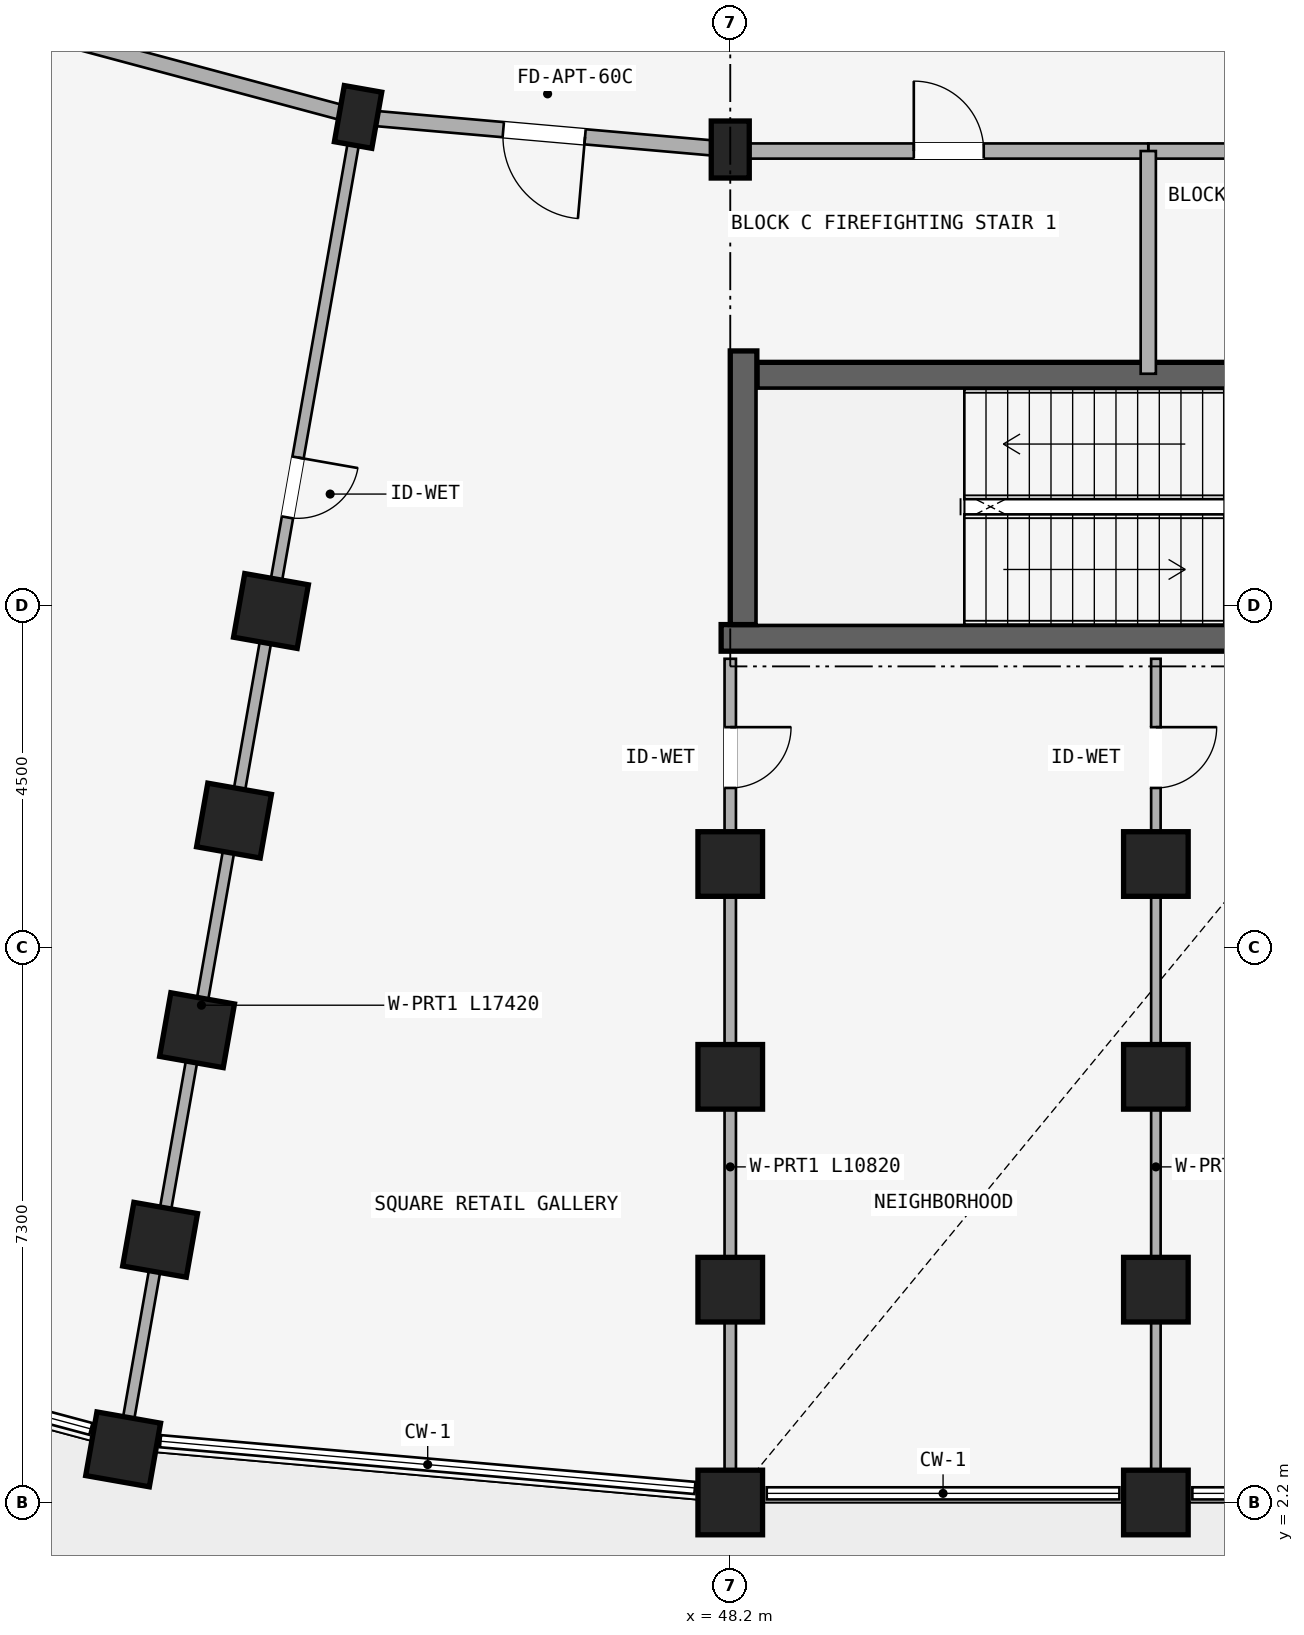
"""IFC4 building model, lengths in metres.
Left out: names, types, materials, properties, quantities, classifications, styles, units other than length and angle.
Written with IfcOpenShell. Run it as: python <this file> out.ifc"""

import sys

from ifc_helpers import new_model, si_unit, direction, frame, frame_2d, origin, origin_2d, place, context, subcontext, project, spatial, rectangle, extrude, element, fill, save


model = new_model("IFC4")
c1 = context("Model", 3, precision=1e-05, world=origin(), true_north=direction((0.0, 1.0)))
c2 = subcontext(c1, "Body", "Model", "MODEL_VIEW")
j1 = project(units=[si_unit("LENGTHUNIT", "METRE"), si_unit("PLANEANGLEUNIT", "RADIAN")], contexts=[c1])
p1 = place(None, origin())
s1 = spatial("IfcSite", under=j1, at=p1, CompositionType="ELEMENT")
p2 = place(p1, origin())
s2 = spatial("IfcBuilding", under=s1, at=p2, CompositionType="ELEMENT")
p3 = place(p2, origin())
s3 = spatial("IfcBuildingStorey", under=s2, at=p3, CompositionType="ELEMENT", Elevation=0.0)
p4 = place(p3, frame((48.08, 13.575, 0.0), z_axis=(0.0, 0.0, 1.0), x_axis=(1.0, 0.0, 0.0)))
e1 = element("IfcWall", 1, at=p4, inside=s3, PredefinedType="SHEAR", context=c2, shape_type="SweptSolid", body=[
    extrude(rectangle(XDim=8.545, YDim=0.35, at=frame_2d((4.272, 0.0))), origin(), (0.0, 0.0, 1.0), 4.15),
])
p5 = place(p3, frame((48.55, 17.025, 0.0), z_axis=(0.0, 0.0, 1.0), x_axis=(1.0, 0.0, 0.0)))
e2 = element("IfcWall", 2, at=p5, inside=s3, PredefinedType="SHEAR", context=c2, shape_type="SweptSolid", body=[
    extrude(rectangle(XDim=8.075, YDim=0.35, at=frame_2d((4.038, 0.0))), origin(), (0.0, 0.0, 1.0), 4.15),
])
p6 = place(p5, frame((6.38, 0.0, 0.0)))
e3 = element("IfcOpeningElement", 3, at=p6, cuts=e2, PredefinedType="OPENING", context=c2, shape_type="SweptSolid", body=[
    extrude(rectangle(XDim=1.24, YDim=2.15, at=frame_2d((0.62, 1.075))), frame((0.0, 0.185, 0.0), z_axis=(0.0, -1.0, 0.0), x_axis=(1.0, 0.0, 0.0)), (0.0, 0.0, 1.0), 0.37),
])
p7 = place(p3, frame((48.375, 17.35, 0.0), z_axis=(0.0, 0.0, 1.0), x_axis=(0.0, -1.0, 0.0)))
e4 = element("IfcWall", 4, at=p7, inside=s3, PredefinedType="SHEAR", context=c2, shape_type="SweptSolid", body=[
    extrude(rectangle(XDim=3.6, YDim=0.35, at=frame_2d((1.8, 0.0))), origin(), (0.0, 0.0, 1.0), 4.15),
])
p8 = place(p3, frame((48.2, 20.0, 0.0), z_axis=(0.0, 0.0, 1.0), x_axis=(1.0, 0.0, 0.0)))
e5 = element("IfcColumn", 5, at=p8, inside=s3, PredefinedType="COLUMN", context=c2, shape_type="SweptSolid", body=[
    extrude(rectangle(XDim=0.5, YDim=0.75, at=origin_2d()), origin(), (0.0, 0.0, 1.0), 4.15),
])
for number, where, z_axis, x_axis in (
    (6, (48.2, 10.6, 0.0), (0.0, 0.0, 1.0), (1.0, 0.0, 0.0)),
    (7, (48.2, 7.8, 0.0), (0.0, 0.0, 1.0), (1.0, 0.0, 0.0)),
    (8, (48.2, 5.0, 0.0), (0.0, 0.0, 1.0), (1.0, 0.0, 0.0)),
    (9, (48.2, 2.2, 0.0), (0.0, 0.0, 1.0), (1.0, 0.0, 0.0)),
):
    element("IfcColumn", number, at=place(p3, frame(where, z_axis=z_axis, x_axis=x_axis)), inside=s3, PredefinedType="COLUMN", context=c2, shape_type="SweptSolid", body=[
        extrude(rectangle(XDim=0.85, YDim=0.85, at=origin_2d()), origin(), (0.0, 0.0, 1.0), 4.15),
    ])
p9 = place(p3, frame((43.303, 20.428, 0.0), z_axis=(0.0, 0.0, 1.0), x_axis=(-0.984807753012, 0.173648177667, 0.0)))
e10 = element("IfcColumn", 10, at=p9, inside=s3, PredefinedType="COLUMN", context=c2, shape_type="SweptSolid", body=[
    extrude(rectangle(XDim=0.5, YDim=0.75, at=origin_2d()), origin(), (0.0, 0.0, 1.0), 4.15),
])
for number, where, z_axis, x_axis in (
    (11, (42.157, 13.929, 0.0), (0.0, 0.0, 1.0), (-0.985, 0.174, 0.0)),
    (12, (41.671, 11.171, 0.0), (0.0, 0.0, 1.0), (-0.985, 0.174, 0.0)),
    (13, (41.185, 8.414, 0.0), (0.0, 0.0, 1.0), (-0.985, 0.174, 0.0)),
    (14, (40.698, 5.656, 0.0), (0.0, 0.0, 1.0), (-0.985, 0.174, 0.0)),
    (15, (40.212, 2.899, 0.0), (0.0, 0.0, 1.0), (-0.985, 0.174, 0.0)),
    (16, (53.8, 10.6, 0.0), (0.0, 0.0, 1.0), (1.0, 0.0, 0.0)),
    (17, (53.8, 7.8, 0.0), (0.0, 0.0, 1.0), (1.0, 0.0, 0.0)),
    (18, (53.8, 5.0, 0.0), (0.0, 0.0, 1.0), (1.0, 0.0, 0.0)),
    (19, (53.8, 2.2, 0.0), (0.0, 0.0, 1.0), (1.0, 0.0, 0.0)),
):
    element("IfcColumn", number, at=place(p3, frame(where, z_axis=z_axis, x_axis=x_axis)), inside=s3, PredefinedType="COLUMN", context=c2, shape_type="SweptSolid", body=[
        extrude(rectangle(XDim=0.85, YDim=0.85, at=origin_2d()), origin(), (0.0, 0.0, 1.0), 4.15),
    ])
p10 = place(p3, frame((53.7, 19.98, 0.0), z_axis=(0.0, 0.0, 1.0), x_axis=(1.0, 0.0, 0.0)))
e20 = element("IfcWall", 20, at=p10, inside=s3, PredefinedType="STANDARD", context=c2, shape_type="SweptSolid", body=[
    extrude(rectangle(XDim=5.65, YDim=0.2, at=frame_2d((2.825, 0.0))), origin(), (0.0, 0.0, 1.0), 3.492),
])
p11 = place(p10, frame((1.923, 0.0, 0.0)))
e21 = element("IfcOpeningElement", 21, at=p11, cuts=e20, PredefinedType="OPENING", context=c2, shape_type="SweptSolid", body=[
    extrude(rectangle(XDim=1.24, YDim=2.15, at=frame_2d((0.62, 1.075))), frame((0.0, 0.11, 0.0), z_axis=(0.0, -1.0, 0.0), x_axis=(1.0, 0.0, 0.0)), (0.0, 0.0, 1.0), 0.22),
])
p12 = place(p3, frame((48.45, 19.98, 0.0), z_axis=(0.0, 0.0, 1.0), x_axis=(1.0, 0.0, 0.0)))
e22 = element("IfcWall", 22, at=p12, inside=s3, PredefinedType="STANDARD", context=c2, shape_type="SweptSolid", body=[
    extrude(rectangle(XDim=5.25, YDim=0.2, at=frame_2d((2.625, 0.0))), origin(), (0.0, 0.0, 1.0), 3.492),
])
p13 = place(p12, frame((2.165, 0.0, 0.0)))
e23 = element("IfcOpeningElement", 23, at=p13, cuts=e22, PredefinedType="OPENING", context=c2, shape_type="SweptSolid", body=[
    extrude(rectangle(XDim=0.92, YDim=2.1, at=frame_2d((0.46, 1.05))), frame((0.0, 0.11, 0.0), z_axis=(0.0, -1.0, 0.0), x_axis=(1.0, 0.0, 0.0)), (0.0, 0.0, 1.0), 0.22),
])
p14 = place(p3, frame((53.7, 19.98, 0.0), z_axis=(0.0, 0.0, 1.0), x_axis=(0.0, -1.0, 0.0)))
e24 = element("IfcWall", 24, at=p14, inside=s3, PredefinedType="STANDARD", context=c2, shape_type="SweptSolid", body=[
    extrude(rectangle(XDim=2.93, YDim=0.2, at=frame_2d((1.465, 0.0))), origin(), (0.0, 0.0, 1.0), 3.492),
])
p15 = place(p3, frame((53.8, 13.3, 0.0), z_axis=(0.0, 0.0, 1.0), x_axis=(0.0, -1.0, 0.0)))
e25 = element("IfcWall", 25, at=p15, inside=s3, PredefinedType="PARTITIONING", context=c2, shape_type="SweptSolid", body=[
    extrude(rectangle(XDim=10.82, YDim=0.125, at=frame_2d((5.41, 0.0))), origin(), (0.0, 0.0, 1.0), 3.492),
])
p16 = place(p15, frame((0.899, 0.0, 0.0)))
e26 = element("IfcOpeningElement", 26, at=p16, cuts=e25, PredefinedType="OPENING", context=c2, shape_type="SweptSolid", body=[
    extrude(rectangle(XDim=0.8, YDim=2.1, at=frame_2d((0.4, 1.05))), frame((0.0, 0.073, 0.0), z_axis=(0.0, -1.0, 0.0), x_axis=(1.0, 0.0, 0.0)), (0.0, 0.0, 1.0), 0.145),
])
p17 = place(p3, frame((48.2, 20.0, 0.0), z_axis=(0.0, 0.0, 1.0), x_axis=(-0.996193663584, 0.087167566415, 0.0)))
e27 = element("IfcWall", 27, at=p17, inside=s3, PredefinedType="STANDARD", context=c2, shape_type="SweptSolid", body=[
    extrude(rectangle(XDim=4.916, YDim=0.2, at=frame_2d((2.458, 0.0))), origin(), (0.0, 0.0, 1.0), 3.492),
])
p18 = place(p17, frame((1.918, 0.0, 0.0)))
e28 = element("IfcOpeningElement", 28, at=p18, cuts=e27, PredefinedType="OPENING", context=c2, shape_type="SweptSolid", body=[
    extrude(rectangle(XDim=1.08, YDim=2.15, at=frame_2d((0.54, 1.075))), frame((0.0, 0.11, 0.0), z_axis=(0.0, -1.0, 0.0), x_axis=(1.0, 0.0, 0.0)), (0.0, 0.0, 1.0), 0.22),
])
p19 = place(p3, frame((43.303, 20.428, 0.0), z_axis=(0.0, 0.0, 1.0), x_axis=(-0.965930095386, 0.258803112091, 0.0)))
e29 = element("IfcWall", 29, at=p19, inside=s3, PredefinedType="STANDARD", context=c2, shape_type="SweptSolid", body=[
    extrude(rectangle(XDim=4.916, YDim=0.2, at=frame_2d((2.458, 0.0))), origin(), (0.0, 0.0, 1.0), 2.942),
])
p20 = place(p3, frame((48.2, 13.3, 0.0), z_axis=(0.0, 0.0, 1.0), x_axis=(0.0, -1.0, 0.0)))
e30 = element("IfcWall", 30, at=p20, inside=s3, PredefinedType="PARTITIONING", context=c2, shape_type="SweptSolid", body=[
    extrude(rectangle(XDim=10.82, YDim=0.15, at=frame_2d((5.41, 0.0))), origin(), (0.0, 0.0, 1.0), 3.492),
])
p21 = place(p20, frame((0.899, 0.0, 0.0)))
e31 = element("IfcOpeningElement", 31, at=p21, cuts=e30, PredefinedType="OPENING", context=c2, shape_type="SweptSolid", body=[
    extrude(rectangle(XDim=0.8, YDim=2.1, at=frame_2d((0.4, 1.05))), frame((0.0, 0.085, 0.0), z_axis=(0.0, -1.0, 0.0), x_axis=(1.0, 0.0, 0.0)), (0.0, 0.0, 1.0), 0.17),
])
p22 = place(p3, frame((43.286, 20.33, 0.0), z_axis=(0.0, 0.0, 1.0), x_axis=(-0.173646216546, -0.984808098809, 0.0)))
e32 = element("IfcWall", 32, at=p22, inside=s3, PredefinedType="PARTITIONING", context=c2, shape_type="SweptSolid", body=[
    extrude(rectangle(XDim=17.42, YDim=0.15, at=frame_2d((8.71, 0.0))), origin(), (0.0, 0.0, 1.0), 2.942),
])
p23 = place(p22, frame((4.45, 0.0, 0.0)))
e33 = element("IfcOpeningElement", 33, at=p23, cuts=e32, PredefinedType="OPENING", context=c2, shape_type="SweptSolid", body=[
    extrude(rectangle(XDim=0.8, YDim=2.1, at=frame_2d((0.4, 1.05))), frame((0.0, 0.085, 0.0), z_axis=(0.0, -1.0, 0.0), x_axis=(1.0, 0.0, 0.0)), (0.0, 0.0, 1.0), 0.17),
])
p24 = place(p13, origin())
e34 = element("IfcDoor", 34, at=p24, inside=s3, OperationType="SINGLE_SWING_LEFT", PredefinedType="DOOR", context=c2, shape_type="SweptSolid", body=[
    extrude(rectangle(XDim=0.92, YDim=2.1, at=frame_2d((0.46, 1.05))), frame((0.0, 0.025, 0.0), z_axis=(0.0, -1.0, 0.0), x_axis=(1.0, 0.0, 0.0)), (0.0, 0.0, 1.0), 0.05),
])
fill(e23, e34)
p25 = place(p16, origin())
e35 = element("IfcDoor", 35, at=p25, inside=s3, OperationType="SINGLE_SWING_LEFT", PredefinedType="DOOR", context=c2, shape_type="SweptSolid", body=[
    extrude(rectangle(XDim=0.8, YDim=2.1, at=frame_2d((0.4, 1.05))), frame((0.0, 0.025, 0.0), z_axis=(0.0, -1.0, 0.0), x_axis=(1.0, 0.0, 0.0)), (0.0, 0.0, 1.0), 0.05),
])
fill(e26, e35)
p26 = place(p21, origin())
e36 = element("IfcDoor", 36, at=p26, inside=s3, OperationType="SINGLE_SWING_LEFT", PredefinedType="DOOR", context=c2, shape_type="SweptSolid", body=[
    extrude(rectangle(XDim=0.8, YDim=2.1, at=frame_2d((0.4, 1.05))), frame((0.0, 0.025, 0.0), z_axis=(0.0, -1.0, 0.0), x_axis=(1.0, 0.0, 0.0)), (0.0, 0.0, 1.0), 0.05),
])
fill(e31, e36)
p27 = place(p23, frame((0.8, 0.0, 0.0), z_axis=(0.0, 0.0, 1.0), x_axis=(-1.0, 0.0, 0.0)))
e37 = element("IfcDoor", 37, at=p27, inside=s3, OperationType="SINGLE_SWING_RIGHT", PredefinedType="DOOR", context=c2, shape_type="SweptSolid", body=[
    extrude(rectangle(XDim=0.8, YDim=2.1, at=frame_2d((0.4, 1.05))), frame((0.0, 0.025, 0.0), z_axis=(0.0, -1.0, 0.0), x_axis=(1.0, 0.0, 0.0)), (0.0, 0.0, 1.0), 0.05),
])
fill(e33, e37)
p28 = place(p18, origin())
e38 = element("IfcDoor", 38, at=p28, inside=s3, OperationType="SINGLE_SWING_LEFT", PredefinedType="DOOR", context=c2, shape_type="SweptSolid", body=[
    extrude(rectangle(XDim=1.08, YDim=2.15, at=frame_2d((0.54, 1.075))), frame((0.0, 0.025, 0.0), z_axis=(0.0, -1.0, 0.0), x_axis=(1.0, 0.0, 0.0)), (0.0, 0.0, 1.0), 0.05),
])
fill(e28, e38)
save(model, sys.argv[1])
